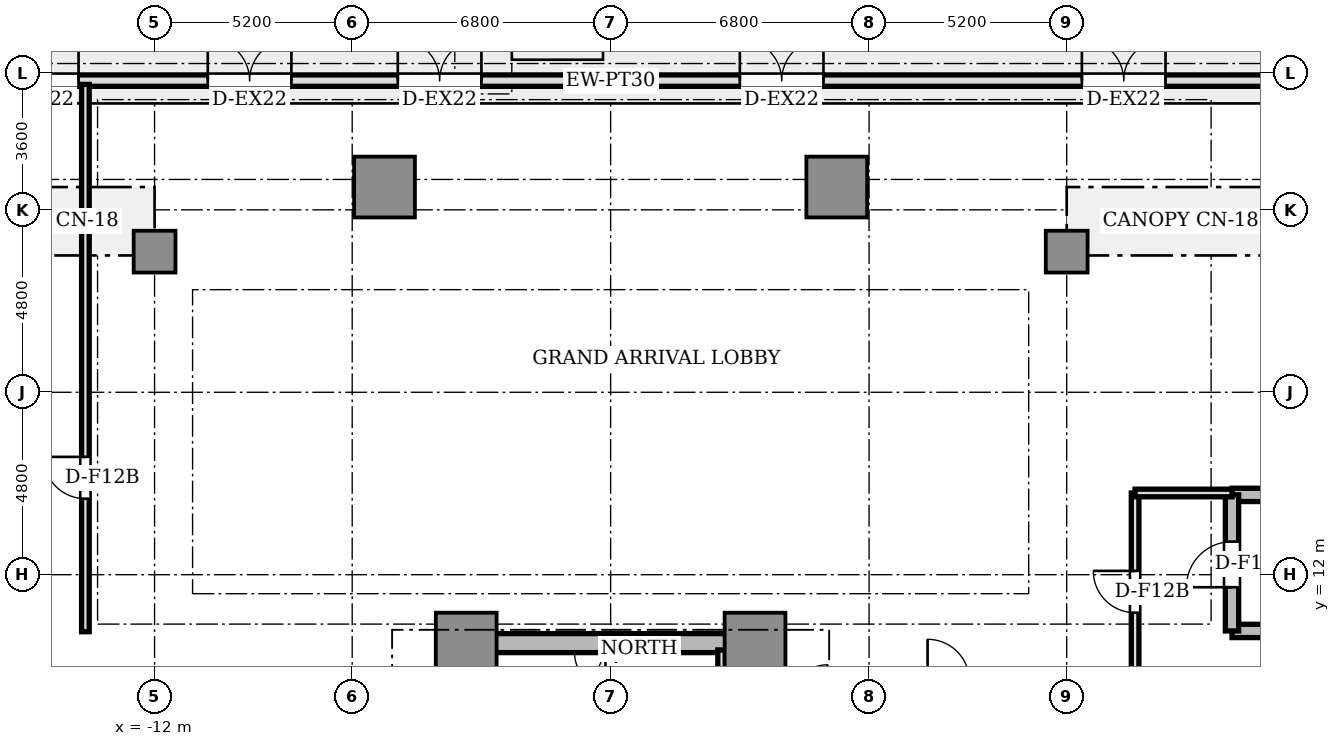
"""IFC4 building model, lengths in metres.
Left out: names, types, materials, properties, quantities, classifications, styles, units other than length and angle.
Written with IfcOpenShell. Run it as: python <this file> out.ifc"""

import sys

from ifc_helpers import new_model, si_unit, direction, frame, frame_2d, origin, origin_2d, place, context, subcontext, project, spatial, rectangle, circle, extrude, source, transform, mapped, element, fill, save


model = new_model("IFC4")
c1 = context("Model", 3, precision=1e-05, world=origin(), true_north=direction((0.0, 1.0)))
c2 = subcontext(c1, "Body", "Model", "MODEL_VIEW")
j1 = project(units=[si_unit("LENGTHUNIT", "METRE"), si_unit("PLANEANGLEUNIT", "RADIAN")], contexts=[c1])
p1 = place(None, origin())
s1 = spatial("IfcSite", under=j1, at=p1, CompositionType="ELEMENT")
p2 = place(p1, origin())
s2 = spatial("IfcBuilding", under=s1, at=p2, CompositionType="ELEMENT")
p3 = place(p2, origin())
s3 = spatial("IfcBuildingStorey", under=s2, at=p3, CompositionType="ELEMENT", Elevation=0.0)
p4 = place(p3, frame((-3.55, 10.2, 0.0), z_axis=(0.0, 0.0, 1.0), x_axis=(1.0, 0.0, 0.0)))
e1 = element("IfcWall", 1, at=p4, inside=s3, PredefinedType="SHEAR", context=c2, shape_type="SweptSolid", body=[
    extrude(rectangle(XDim=7.1, YDim=0.5, at=frame_2d((3.55, 0.0))), origin(), (0.0, 0.0, 1.0), 4.48),
])
p5 = place(p3, frame((-3.8, 2.85, 0.0), z_axis=(0.0, 0.0, 1.0), x_axis=(0.0, 1.0, 0.0)))
e2 = element("IfcWall", 2, at=p5, inside=s3, PredefinedType="SHEAR", context=c2, shape_type="SweptSolid", body=[
    extrude(rectangle(XDim=6.9, YDim=0.5, at=frame_2d((3.45, 0.0))), origin(), (0.0, 0.0, 1.0), 4.48),
])
m1 = source(origin(), c2, "Body", "SweptSolid", [
    extrude(rectangle(XDim=1.6, YDim=1.6, at=origin_2d()), origin(), (0.0, 0.0, 1.0), 4.48),
])
for number, where, z_axis, x_axis in (
    (3, (-3.8, 10.2, 0.0), (0.0, 0.0, 1.0), (1.0, 0.0, 0.0)),
    (4, (3.8, 10.2, 0.0), (0.0, 0.0, 1.0), (1.0, 0.0, 0.0)),
    (5, (5.95, 22.2, 0.0), (0.0, 0.0, 1.0), (1.0, 0.0, 0.0)),
    (6, (-5.95, 22.2, 0.0), (0.0, 0.0, 1.0), (1.0, 0.0, 0.0)),
):
    element("IfcColumn", number, at=place(p3, frame(where, z_axis=z_axis, x_axis=x_axis)), inside=s3, PredefinedType="COLUMN", context=c2, shape_type="MappedRepresentation", body=[
        mapped(m1, transform((0.0, 0.0, 0.0), scale=1.0)),
    ])
m2 = source(origin(), c2, "Body", "SweptSolid", [
    extrude(circle(Radius=0.55, at=origin_2d()), origin(), (0.0, 0.0, 1.0), 4.48),
])
for number, where, z_axis, x_axis in (
    (7, (-12.0, 20.5, 0.0), (0.0, 0.0, 1.0), (1.0, 0.0, 0.0)),
    (8, (12.0, 20.5, 0.0), (0.0, 0.0, 1.0), (1.0, 0.0, 0.0)),
):
    element("IfcColumn", number, at=place(p3, frame(where, z_axis=z_axis, x_axis=x_axis)), inside=s3, PredefinedType="COLUMN", context=c2, shape_type="MappedRepresentation", body=[
        mapped(m2, transform((0.0, 0.0, 0.0), scale=1.0)),
    ])
p6 = place(p3, frame((-33.4, 25.0, 0.0), z_axis=(0.0, 0.0, 1.0), x_axis=(1.0, 0.0, 0.0)))
e9 = element("IfcWall", 9, at=p6, inside=s3, PredefinedType="STANDARD", context=c2, shape_type="SweptSolid", body=[
    extrude(rectangle(XDim=66.8, YDim=0.3, at=frame_2d((33.4, 0.0))), origin(), (0.0, 0.0, 1.0), 3.8),
])
p7 = place(p6, frame((17.2, 0.0, 0.0)))
e10 = element("IfcOpeningElement", 10, at=p7, cuts=e9, PredefinedType="OPENING", context=c2, shape_type="SweptSolid", body=[
    extrude(rectangle(XDim=2.2, YDim=2.4, at=frame_2d((1.1, 1.2))), frame((0.0, 0.16, 0.0), z_axis=(0.0, -1.0, 0.0), x_axis=(1.0, 0.0, 0.0)), (0.0, 0.0, 1.0), 0.32),
])
p8 = place(p6, frame((22.8, 0.0, 0.0)))
e11 = element("IfcOpeningElement", 11, at=p8, cuts=e9, PredefinedType="OPENING", context=c2, shape_type="SweptSolid", body=[
    extrude(rectangle(XDim=2.2, YDim=2.4, at=frame_2d((1.1, 1.2))), frame((0.0, 0.16, 0.0), z_axis=(0.0, -1.0, 0.0), x_axis=(1.0, 0.0, 0.0)), (0.0, 0.0, 1.0), 0.32),
])
p9 = place(p6, frame((27.8, 0.0, 0.0)))
e12 = element("IfcOpeningElement", 12, at=p9, cuts=e9, PredefinedType="OPENING", context=c2, shape_type="SweptSolid", body=[
    extrude(rectangle(XDim=2.2, YDim=2.4, at=frame_2d((1.1, 1.2))), frame((0.0, 0.16, 0.0), z_axis=(0.0, -1.0, 0.0), x_axis=(1.0, 0.0, 0.0)), (0.0, 0.0, 1.0), 0.32),
])
p10 = place(p6, frame((36.8, 0.0, 0.0)))
e13 = element("IfcOpeningElement", 13, at=p10, cuts=e9, PredefinedType="OPENING", context=c2, shape_type="SweptSolid", body=[
    extrude(rectangle(XDim=2.2, YDim=2.4, at=frame_2d((1.1, 1.2))), frame((0.0, 0.16, 0.0), z_axis=(0.0, -1.0, 0.0), x_axis=(1.0, 0.0, 0.0)), (0.0, 0.0, 1.0), 0.32),
])
p11 = place(p6, frame((45.8, 0.0, 0.0)))
e14 = element("IfcOpeningElement", 14, at=p11, cuts=e9, PredefinedType="OPENING", context=c2, shape_type="SweptSolid", body=[
    extrude(rectangle(XDim=2.2, YDim=2.4, at=frame_2d((1.1, 1.2))), frame((0.0, 0.16, 0.0), z_axis=(0.0, -1.0, 0.0), x_axis=(1.0, 0.0, 0.0)), (0.0, 0.0, 1.0), 0.32),
])
p12 = place(p6, frame((55.8, 0.0, 0.0)))
e15 = element("IfcOpeningElement", 15, at=p12, cuts=e9, PredefinedType="OPENING", context=c2, shape_type="SweptSolid", body=[
    extrude(rectangle(XDim=1.2, YDim=2.2, at=frame_2d((0.6, 1.1))), frame((0.0, 0.16, 0.0), z_axis=(0.0, -1.0, 0.0), x_axis=(1.0, 0.0, 0.0)), (0.0, 0.0, 1.0), 0.32),
])
p13 = place(p3, frame((0.0, 2.5, 0.0), z_axis=(0.0, 0.0, 1.0), x_axis=(0.0, 1.0, 0.0)))
e16 = element("IfcWall", 16, at=p13, inside=s3, PredefinedType="SOLIDWALL", context=c2, shape_type="SweptSolid", body=[
    extrude(rectangle(XDim=7.68, YDim=0.2, at=frame_2d((3.84, 0.0))), origin(), (0.0, 0.0, 1.0), 4.48),
])
p14 = place(p13, frame((6.5, 0.0, 0.0)))
e17 = element("IfcOpeningElement", 17, at=p14, cuts=e16, PredefinedType="OPENING", context=c2, shape_type="SweptSolid", body=[
    extrude(rectangle(XDim=0.95, YDim=2.15, at=frame_2d((0.475, 1.075))), frame((0.0, 0.11, 0.0), z_axis=(0.0, -1.0, 0.0), x_axis=(1.0, 0.0, 0.0)), (0.0, 0.0, 1.0), 0.22),
])
for number, where, z_axis, x_axis in (
    (18, (16.35, 14.1, 0.0), (0.0, 0.0, 1.0), (1.0, 0.0, 0.0)),
    (19, (16.35, 10.52, 0.0), (0.0, 0.0, 1.0), (1.0, 0.0, 0.0)),
):
    element("IfcWall", number, at=place(p3, frame(where, z_axis=z_axis, x_axis=x_axis)), inside=s3, PredefinedType="SHEAR", context=c2, shape_type="SweptSolid", body=[
        extrude(rectangle(XDim=10.25, YDim=0.35, at=frame_2d((5.125, 0.0))), origin(), (0.0, 0.0, 1.0), 4.48),
    ])
p15 = place(p3, frame((16.35, 10.52, 0.0), z_axis=(0.0, 0.0, 1.0), x_axis=(0.0, 1.0, 0.0)))
e20 = element("IfcWall", 20, at=p15, inside=s3, PredefinedType="SHEAR", context=c2, shape_type="SweptSolid", body=[
    extrude(rectangle(XDim=3.58, YDim=0.35, at=frame_2d((1.79, 0.0))), origin(), (0.0, 0.0, 1.0), 4.48),
])
p16 = place(p15, frame((1.15, 0.0, 0.0)))
e21 = element("IfcOpeningElement", 21, at=p16, cuts=e20, PredefinedType="OPENING", context=c2, shape_type="SweptSolid", body=[
    extrude(rectangle(XDim=1.2, YDim=2.2, at=frame_2d((0.6, 1.1))), frame((0.0, 0.185, 0.0), z_axis=(0.0, -1.0, 0.0), x_axis=(1.0, 0.0, 0.0)), (0.0, 0.0, 1.0), 0.37),
])
p17 = place(p3, frame((-13.82, 10.5, 0.0), z_axis=(0.0, 0.0, 1.0), x_axis=(0.0, 1.0, 0.0)))
e22 = element("IfcWall", 22, at=p17, inside=s3, PredefinedType="SOLIDWALL", context=c2, shape_type="SweptSolid", body=[
    extrude(rectangle(XDim=14.4, YDim=0.2, at=frame_2d((7.2, 0.0))), origin(), (0.0, 0.0, 1.0), 4.03),
])
p18 = place(p17, frame((3.5, 0.0, 0.0)))
e23 = element("IfcOpeningElement", 23, at=p18, cuts=e22, PredefinedType="OPENING", context=c2, shape_type="SweptSolid", body=[
    extrude(rectangle(XDim=1.1, YDim=2.15, at=frame_2d((0.55, 1.075))), frame((0.0, 0.11, 0.0), z_axis=(0.0, -1.0, 0.0), x_axis=(1.0, 0.0, 0.0)), (0.0, 0.0, 1.0), 0.22),
])
p19 = place(p3, frame((2.92, 9.38, 0.0), z_axis=(0.0, 0.0, 1.0), x_axis=(0.0, 1.0, 0.0)))
e24 = element("IfcWall", 24, at=p19, inside=s3, PredefinedType="SOLIDWALL", context=c2, shape_type="SweptSolid", body=[
    extrude(rectangle(XDim=0.64, YDim=0.2, at=frame_2d((0.32, 0.0))), origin(), (0.0, 0.0, 1.0), 4.03),
])
p20 = place(p3, frame((13.8, 9.2, 0.0), z_axis=(0.0, 0.0, 1.0), x_axis=(0.0, 1.0, 0.0)))
e25 = element("IfcWall", 25, at=p20, inside=s3, PredefinedType="SOLIDWALL", context=c2, shape_type="SweptSolid", body=[
    extrude(rectangle(XDim=4.95, YDim=0.2, at=frame_2d((2.475, 0.0))), origin(), (0.0, 0.0, 1.0), 4.03),
])
p21 = place(p20, frame((1.8, 0.0, 0.0)))
e26 = element("IfcOpeningElement", 26, at=p21, cuts=e25, PredefinedType="OPENING", context=c2, shape_type="SweptSolid", body=[
    extrude(rectangle(XDim=1.1, YDim=2.15, at=frame_2d((0.55, 1.075))), frame((0.0, 0.11, 0.0), z_axis=(0.0, -1.0, 0.0), x_axis=(1.0, 0.0, 0.0)), (0.0, 0.0, 1.0), 0.22),
])
p22 = place(p3, frame((13.8, 14.15, 0.0), z_axis=(0.0, 0.0, 1.0), x_axis=(1.0, 0.0, 0.0)))
e27 = element("IfcWall", 27, at=p22, inside=s3, PredefinedType="SOLIDWALL", context=c2, shape_type="SweptSolid", body=[
    extrude(rectangle(XDim=2.55, YDim=0.2, at=frame_2d((1.275, 0.0))), origin(), (0.0, 0.0, 1.0), 4.03),
])
m3 = source(origin(), c2, "Body", "SweptSolid", [
    extrude(rectangle(XDim=2.2, YDim=0.05, at=origin_2d()), origin(), (0.0, 0.0, 1.0), 2.4),
])
p23 = place(p7, frame((1.1, 0.0, 0.0)))
e28 = element("IfcDoor", 28, at=p23, inside=s3, OperationType="DOUBLE_DOOR_SINGLE_SWING", PredefinedType="DOOR", context=c2, shape_type="MappedRepresentation", body=[
    mapped(m3, transform((0.0, 0.0, 0.0), scale=1.0)),
])
fill(e10, e28)
p24 = place(p8, frame((1.1, 0.0, 0.0)))
e29 = element("IfcDoor", 29, at=p24, inside=s3, OperationType="DOUBLE_DOOR_SINGLE_SWING", PredefinedType="DOOR", context=c2, shape_type="MappedRepresentation", body=[
    mapped(m3, transform((0.0, 0.0, 0.0), scale=1.0)),
])
fill(e11, e29)
p25 = place(p9, frame((1.1, 0.0, 0.0)))
e30 = element("IfcDoor", 30, at=p25, inside=s3, OperationType="DOUBLE_DOOR_SINGLE_SWING", PredefinedType="DOOR", context=c2, shape_type="MappedRepresentation", body=[
    mapped(m3, transform((0.0, 0.0, 0.0), scale=1.0)),
])
fill(e12, e30)
p26 = place(p10, frame((1.1, 0.0, 0.0)))
e31 = element("IfcDoor", 31, at=p26, inside=s3, OperationType="DOUBLE_DOOR_SINGLE_SWING", PredefinedType="DOOR", context=c2, shape_type="MappedRepresentation", body=[
    mapped(m3, transform((0.0, 0.0, 0.0), scale=1.0)),
])
fill(e13, e31)
p27 = place(p11, frame((1.1, 0.0, 0.0)))
e32 = element("IfcDoor", 32, at=p27, inside=s3, OperationType="DOUBLE_DOOR_SINGLE_SWING", PredefinedType="DOOR", context=c2, shape_type="MappedRepresentation", body=[
    mapped(m3, transform((0.0, 0.0, 0.0), scale=1.0)),
])
fill(e14, e32)
m4 = source(origin(), c2, "Body", "SweptSolid", [
    extrude(rectangle(XDim=0.95, YDim=0.05, at=origin_2d()), origin(), (0.0, 0.0, 1.0), 2.15),
])
p28 = place(p14, frame((0.475, 0.0, 0.0)))
e33 = element("IfcDoor", 33, at=p28, inside=s3, OperationType="SINGLE_SWING_RIGHT", PredefinedType="DOOR", context=c2, shape_type="MappedRepresentation", body=[
    mapped(m4, transform((0.0, 0.0, 0.0), scale=1.0)),
])
fill(e17, e33)
m5 = source(origin(), c2, "Body", "SweptSolid", [
    extrude(rectangle(XDim=1.2, YDim=0.05, at=origin_2d()), origin(), (0.0, 0.0, 1.0), 2.2),
])
p29 = place(p16, frame((0.6, 0.0, 0.0)))
e34 = element("IfcDoor", 34, at=p29, inside=s3, OperationType="SINGLE_SWING_LEFT", PredefinedType="DOOR", context=c2, shape_type="MappedRepresentation", body=[
    mapped(m5, transform((0.0, 0.0, 0.0), scale=1.0)),
])
fill(e21, e34)
m6 = source(origin(), c2, "Body", "SweptSolid", [
    extrude(rectangle(XDim=1.1, YDim=0.05, at=origin_2d()), origin(), (0.0, 0.0, 1.0), 2.15),
])
p30 = place(p18, frame((0.55, 0.0, 0.0)))
e35 = element("IfcDoor", 35, at=p30, inside=s3, OperationType="SINGLE_SWING_RIGHT", PredefinedType="DOOR", context=c2, shape_type="MappedRepresentation", body=[
    mapped(m6, transform((0.0, 0.0, 0.0), scale=1.0)),
])
fill(e23, e35)
p31 = place(p21, frame((0.55, 0.0, 0.0)))
e36 = element("IfcDoor", 36, at=p31, inside=s3, OperationType="SINGLE_SWING_RIGHT", PredefinedType="DOOR", context=c2, shape_type="MappedRepresentation", body=[
    mapped(m6, transform((0.0, 0.0, 0.0), scale=1.0)),
])
fill(e26, e36)
save(model, sys.argv[1])
